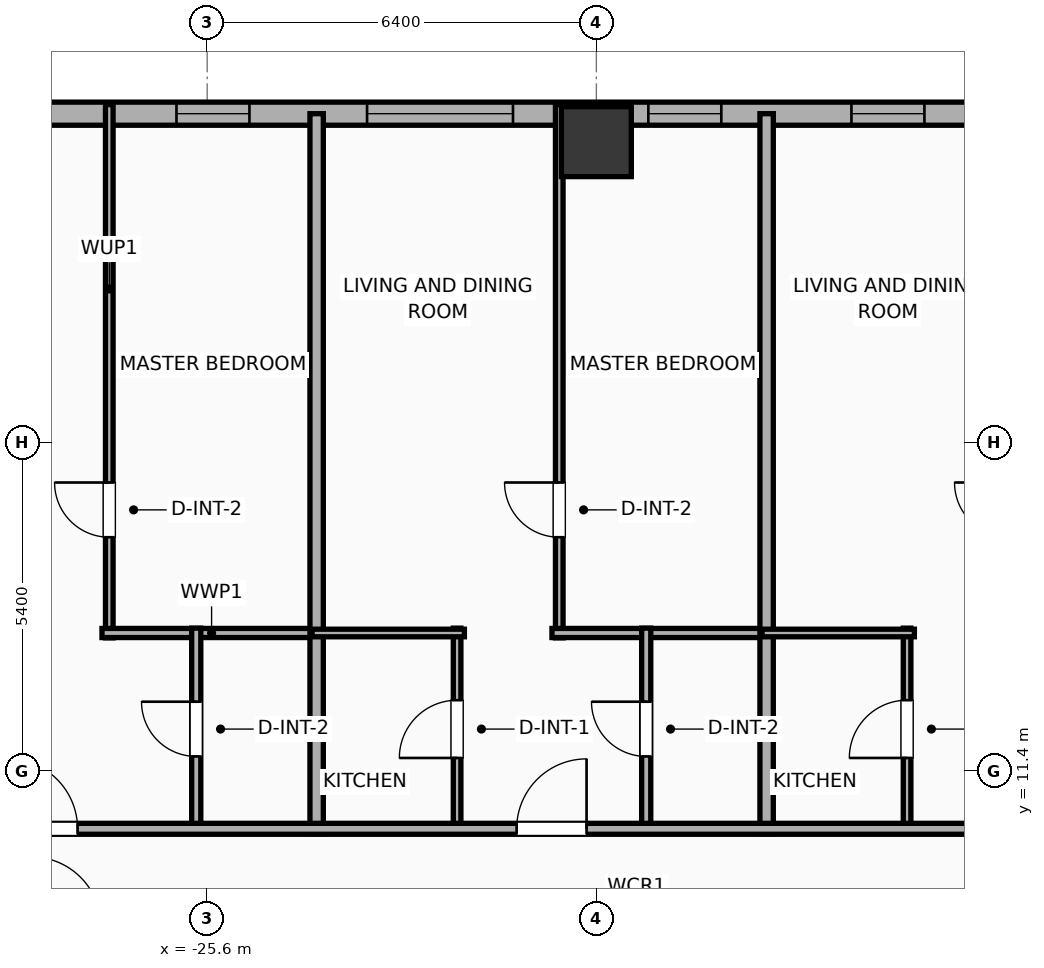
"""IFC4 building model, lengths in metres.
Left out: names, types, materials, properties, quantities, classifications, styles, units other than length and angle.
Written with IfcOpenShell. Run it as: python <this file> out.ifc"""

import sys

from ifc_helpers import new_model, si_unit, direction, frame, frame_2d, origin, origin_2d, place, context, subcontext, project, spatial, rectangle, hollow_rectangle, extrude, element, fill, save


model = new_model("IFC4")
c1 = context("Model", 3, precision=1e-05, world=origin(), true_north=direction((0.0, 1.0)))
c2 = subcontext(c1, "Body", "Model", "MODEL_VIEW")
j1 = project(units=[si_unit("LENGTHUNIT", "METRE"), si_unit("PLANEANGLEUNIT", "RADIAN")], contexts=[c1])
p1 = place(None, origin())
s1 = spatial("IfcSite", under=j1, at=p1, CompositionType="ELEMENT")
p2 = place(p1, origin())
s2 = spatial("IfcBuilding", under=s1, at=p2, CompositionType="ELEMENT")
p3 = place(p2, frame((0.0, 0.0, 57.2)))
s3 = spatial("IfcBuildingStorey", under=s2, at=p3, CompositionType="ELEMENT", Elevation=57.2)
p4 = place(p3, frame((-19.2, 21.75, 0.0), z_axis=(0.0, 0.0, 1.0), x_axis=(1.0, 0.0, 0.0)))
e1 = element("IfcColumn", 1, at=p4, inside=s3, PredefinedType="COLUMN", context=c2, shape_type="SweptSolid", body=[
    extrude(hollow_rectangle(XDim=1.15, YDim=1.15, WallThickness=0.04, at=origin_2d()), origin(), (0.0, 0.0, 1.0), 3.9),
])
p5 = place(p3, frame((-29.581, 22.21, 0.0), z_axis=(0.0, 0.0, 1.0), x_axis=(1.0, 0.0, 0.0)))
e2 = element("IfcWall", 2, at=p5, inside=s3, PredefinedType="ELEMENTEDWALL", context=c2, shape_type="SweptSolid", body=[
    extrude(rectangle(XDim=51.963, YDim=0.38, at=frame_2d((25.981, 0.0))), origin(), (0.0, 0.0, 1.0), 3.65),
])
p6 = place(p5, frame((6.61, 0.0, 0.75)))
e3 = element("IfcOpeningElement", 3, at=p6, cuts=e2, PredefinedType="OPENING", context=c2, shape_type="SweptSolid", body=[
    extrude(rectangle(XDim=2.4, YDim=2.1, at=frame_2d((1.2, 1.05))), frame((0.0, 0.2, 0.0), z_axis=(0.0, -1.0, 0.0), x_axis=(1.0, 0.0, 0.0)), (0.0, 0.0, 1.0), 0.4),
])
p7 = place(p5, frame((24.781, 0.0, 0.75)))
e4 = element("IfcOpeningElement", 4, at=p7, cuts=e2, PredefinedType="OPENING", context=c2, shape_type="SweptSolid", body=[
    extrude(rectangle(XDim=2.4, YDim=2.1, at=frame_2d((1.2, 1.05))), frame((0.0, 0.2, 0.0), z_axis=(0.0, -1.0, 0.0), x_axis=(1.0, 0.0, 0.0)), (0.0, 0.0, 1.0), 0.4),
])
p8 = place(p5, frame((42.952, 0.0, 0.75)))
e5 = element("IfcOpeningElement", 5, at=p8, cuts=e2, PredefinedType="OPENING", context=c2, shape_type="SweptSolid", body=[
    extrude(rectangle(XDim=2.4, YDim=2.1, at=frame_2d((1.2, 1.05))), frame((0.0, 0.2, 0.0), z_axis=(0.0, -1.0, 0.0), x_axis=(1.0, 0.0, 0.0)), (0.0, 0.0, 1.0), 0.4),
])
p9 = place(p5, frame((3.476, 0.0, 0.75)))
e6 = element("IfcOpeningElement", 6, at=p9, cuts=e2, PredefinedType="OPENING", context=c2, shape_type="SweptSolid", body=[
    extrude(rectangle(XDim=1.2, YDim=2.05, at=frame_2d((0.6, 1.025))), frame((0.0, 0.2, 0.0), z_axis=(0.0, -1.0, 0.0), x_axis=(1.0, 0.0, 0.0)), (0.0, 0.0, 1.0), 0.4),
])
p10 = place(p5, frame((11.236, 0.0, 0.75)))
e7 = element("IfcOpeningElement", 7, at=p10, cuts=e2, PredefinedType="OPENING", context=c2, shape_type="SweptSolid", body=[
    extrude(rectangle(XDim=1.2, YDim=2.05, at=frame_2d((0.6, 1.025))), frame((0.0, 0.2, 0.0), z_axis=(0.0, -1.0, 0.0), x_axis=(1.0, 0.0, 0.0)), (0.0, 0.0, 1.0), 0.4),
])
p11 = place(p5, frame((14.576, 0.0, 0.75)))
e8 = element("IfcOpeningElement", 8, at=p11, cuts=e2, PredefinedType="OPENING", context=c2, shape_type="SweptSolid", body=[
    extrude(rectangle(XDim=1.2, YDim=2.05, at=frame_2d((0.6, 1.025))), frame((0.0, 0.2, 0.0), z_axis=(0.0, -1.0, 0.0), x_axis=(1.0, 0.0, 0.0)), (0.0, 0.0, 1.0), 0.4),
])
p12 = place(p5, frame((18.276, 0.0, 0.75)))
e9 = element("IfcOpeningElement", 9, at=p12, cuts=e2, PredefinedType="OPENING", context=c2, shape_type="SweptSolid", body=[
    extrude(rectangle(XDim=1.2, YDim=2.05, at=frame_2d((0.6, 1.025))), frame((0.0, 0.2, 0.0), z_axis=(0.0, -1.0, 0.0), x_axis=(1.0, 0.0, 0.0)), (0.0, 0.0, 1.0), 0.4),
])
p13 = place(p5, frame((21.976, 0.0, 0.75)))
e10 = element("IfcOpeningElement", 10, at=p13, cuts=e2, PredefinedType="OPENING", context=c2, shape_type="SweptSolid", body=[
    extrude(rectangle(XDim=1.2, YDim=2.05, at=frame_2d((0.6, 1.025))), frame((0.0, 0.2, 0.0), z_axis=(0.0, -1.0, 0.0), x_axis=(1.0, 0.0, 0.0)), (0.0, 0.0, 1.0), 0.4),
])
p14 = place(p5, frame((29.136, 0.0, 0.75)))
e11 = element("IfcOpeningElement", 11, at=p14, cuts=e2, PredefinedType="OPENING", context=c2, shape_type="SweptSolid", body=[
    extrude(rectangle(XDim=1.2, YDim=2.05, at=frame_2d((0.6, 1.025))), frame((0.0, 0.2, 0.0), z_axis=(0.0, -1.0, 0.0), x_axis=(1.0, 0.0, 0.0)), (0.0, 0.0, 1.0), 0.4),
])
p15 = place(p5, frame((33.076, 0.0, 0.75)))
e12 = element("IfcOpeningElement", 12, at=p15, cuts=e2, PredefinedType="OPENING", context=c2, shape_type="SweptSolid", body=[
    extrude(rectangle(XDim=1.2, YDim=2.05, at=frame_2d((0.6, 1.025))), frame((0.0, 0.2, 0.0), z_axis=(0.0, -1.0, 0.0), x_axis=(1.0, 0.0, 0.0)), (0.0, 0.0, 1.0), 0.4),
])
p16 = place(p5, frame((36.776, 0.0, 0.75)))
e13 = element("IfcOpeningElement", 13, at=p16, cuts=e2, PredefinedType="OPENING", context=c2, shape_type="SweptSolid", body=[
    extrude(rectangle(XDim=1.2, YDim=2.05, at=frame_2d((0.6, 1.025))), frame((0.0, 0.2, 0.0), z_axis=(0.0, -1.0, 0.0), x_axis=(1.0, 0.0, 0.0)), (0.0, 0.0, 1.0), 0.4),
])
p17 = place(p5, frame((39.931, 0.0, 0.75)))
e14 = element("IfcOpeningElement", 14, at=p17, cuts=e2, PredefinedType="OPENING", context=c2, shape_type="SweptSolid", body=[
    extrude(rectangle(XDim=0.85, YDim=2.05, at=frame_2d((0.425, 1.025))), frame((0.0, 0.2, 0.0), z_axis=(0.0, -1.0, 0.0), x_axis=(1.0, 0.0, 0.0)), (0.0, 0.0, 1.0), 0.4),
])
p18 = place(p5, frame((47.469, 0.0, 0.75)))
e15 = element("IfcOpeningElement", 15, at=p18, cuts=e2, PredefinedType="OPENING", context=c2, shape_type="SweptSolid", body=[
    extrude(rectangle(XDim=1.2, YDim=2.05, at=frame_2d((0.6, 1.025))), frame((0.0, 0.2, 0.0), z_axis=(0.0, -1.0, 0.0), x_axis=(1.0, 0.0, 0.0)), (0.0, 0.0, 1.0), 0.4),
])
p19 = place(p5, frame((49.581, 0.0, 0.75)))
e16 = element("IfcOpeningElement", 16, at=p19, cuts=e2, PredefinedType="OPENING", context=c2, shape_type="SweptSolid", body=[
    extrude(rectangle(XDim=1.2, YDim=2.05, at=frame_2d((0.6, 1.025))), frame((0.0, 0.2, 0.0), z_axis=(0.0, -1.0, 0.0), x_axis=(1.0, 0.0, 0.0)), (0.0, 0.0, 1.0), 0.4),
])
p20 = place(p3, frame((-27.21, 13.59, 0.0), z_axis=(0.0, 0.0, 1.0), x_axis=(0.0, 1.0, 0.0)))
e17 = element("IfcWall", 17, at=p20, inside=s3, PredefinedType="PARTITIONING", context=c2, shape_type="SweptSolid", body=[
    extrude(rectangle(XDim=8.77, YDim=0.125, at=frame_2d((4.385, 0.0))), origin(), (0.0, 0.0, 1.0), 3.65),
])
p21 = place(p20, frame((1.655, 0.0, 0.0)))
e18 = element("IfcOpeningElement", 18, at=p21, cuts=e17, PredefinedType="OPENING", context=c2, shape_type="SweptSolid", body=[
    extrude(rectangle(XDim=0.9, YDim=2.05, at=frame_2d((0.45, 1.025))), frame((0.0, 0.073, 0.0), z_axis=(0.0, -1.0, 0.0), x_axis=(1.0, 0.0, 0.0)), (0.0, 0.0, 1.0), 0.145),
])
p22 = place(p3, frame((-27.33, 13.67, 0.0), z_axis=(0.0, 0.0, 1.0), x_axis=(1.0, 0.0, 0.0)))
e19 = element("IfcWall", 19, at=p22, inside=s3, PredefinedType="PLUMBINGWALL", context=c2, shape_type="SweptSolid", body=[
    extrude(rectangle(XDim=3.605, YDim=0.15, at=frame_2d((1.802, 0.0))), origin(), (0.0, 0.0, 1.0), 3.65),
])
p23 = place(p3, frame((-25.78, 10.43, 0.0), z_axis=(0.0, 0.0, 1.0), x_axis=(0.0, 1.0, 0.0)))
e20 = element("IfcWall", 20, at=p23, inside=s3, PredefinedType="PLUMBINGWALL", context=c2, shape_type="SweptSolid", body=[
    extrude(rectangle(XDim=3.32, YDim=0.15, at=frame_2d((1.66, 0.0))), origin(), (0.0, 0.0, 1.0), 3.65),
])
p24 = place(p23, frame((1.21, 0.0, 0.0)))
e21 = element("IfcOpeningElement", 21, at=p24, cuts=e20, PredefinedType="OPENING", context=c2, shape_type="SweptSolid", body=[
    extrude(rectangle(XDim=0.9, YDim=2.05, at=frame_2d((0.45, 1.025))), frame((0.0, 0.085, 0.0), z_axis=(0.0, -1.0, 0.0), x_axis=(1.0, 0.0, 0.0)), (0.0, 0.0, 1.0), 0.17),
])
p25 = place(p3, frame((-23.8, 10.37, 0.0), z_axis=(0.0, 0.0, 1.0), x_axis=(0.0, 1.0, 0.0)))
e22 = element("IfcWall", 22, at=p25, inside=s3, PredefinedType="PARTITIONING", context=c2, shape_type="SweptSolid", body=[
    extrude(rectangle(XDim=11.84, YDim=0.22, at=frame_2d((5.92, 0.0))), origin(), (0.0, 0.0, 1.0), 3.65),
])
p26 = place(p3, frame((-19.81, 13.59, 0.0), z_axis=(0.0, 0.0, 1.0), x_axis=(0.0, 1.0, 0.0)))
e23 = element("IfcWall", 23, at=p26, inside=s3, PredefinedType="PARTITIONING", context=c2, shape_type="SweptSolid", body=[
    extrude(rectangle(XDim=8.77, YDim=0.125, at=frame_2d((4.385, 0.0))), origin(), (0.0, 0.0, 1.0), 3.65),
])
p27 = place(p26, frame((1.655, 0.0, 0.0)))
e24 = element("IfcOpeningElement", 24, at=p27, cuts=e23, PredefinedType="OPENING", context=c2, shape_type="SweptSolid", body=[
    extrude(rectangle(XDim=0.9, YDim=2.05, at=frame_2d((0.45, 1.025))), frame((0.0, 0.073, 0.0), z_axis=(0.0, -1.0, 0.0), x_axis=(1.0, 0.0, 0.0)), (0.0, 0.0, 1.0), 0.145),
])
p28 = place(p3, frame((-19.93, 13.67, 0.0), z_axis=(0.0, 0.0, 1.0), x_axis=(1.0, 0.0, 0.0)))
e25 = element("IfcWall", 25, at=p28, inside=s3, PredefinedType="PLUMBINGWALL", context=c2, shape_type="SweptSolid", body=[
    extrude(rectangle(XDim=3.605, YDim=0.15, at=frame_2d((1.802, 0.0))), origin(), (0.0, 0.0, 1.0), 3.65),
])
p29 = place(p3, frame((-21.49, 10.43, 0.0), z_axis=(0.0, 0.0, 1.0), x_axis=(0.0, 1.0, 0.0)))
e26 = element("IfcWall", 26, at=p29, inside=s3, PredefinedType="PARTITIONING", context=c2, shape_type="SweptSolid", body=[
    extrude(rectangle(XDim=3.32, YDim=0.125, at=frame_2d((1.66, 0.0))), origin(), (0.0, 0.0, 1.0), 3.65),
])
p30 = place(p29, frame((1.185, 0.0, 0.0)))
e27 = element("IfcOpeningElement", 27, at=p30, cuts=e26, PredefinedType="OPENING", context=c2, shape_type="SweptSolid", body=[
    extrude(rectangle(XDim=0.95, YDim=2.05, at=frame_2d((0.475, 1.025))), frame((0.0, 0.073, 0.0), z_axis=(0.0, -1.0, 0.0), x_axis=(1.0, 0.0, 0.0)), (0.0, 0.0, 1.0), 0.145),
])
p31 = place(p3, frame((-23.875, 13.67, 0.0), z_axis=(0.0, 0.0, 1.0), x_axis=(1.0, 0.0, 0.0)))
e28 = element("IfcWall", 28, at=p31, inside=s3, PredefinedType="PARTITIONING", context=c2, shape_type="SweptSolid", body=[
    extrude(rectangle(XDim=2.505, YDim=0.125, at=frame_2d((1.252, 0.0))), origin(), (0.0, 0.0, 1.0), 3.65),
])
p32 = place(p3, frame((-18.38, 10.43, 0.0), z_axis=(0.0, 0.0, 1.0), x_axis=(0.0, 1.0, 0.0)))
e29 = element("IfcWall", 29, at=p32, inside=s3, PredefinedType="PLUMBINGWALL", context=c2, shape_type="SweptSolid", body=[
    extrude(rectangle(XDim=3.32, YDim=0.15, at=frame_2d((1.66, 0.0))), origin(), (0.0, 0.0, 1.0), 3.65),
])
p33 = place(p32, frame((1.21, 0.0, 0.0)))
e30 = element("IfcOpeningElement", 30, at=p33, cuts=e29, PredefinedType="OPENING", context=c2, shape_type="SweptSolid", body=[
    extrude(rectangle(XDim=0.9, YDim=2.05, at=frame_2d((0.45, 1.025))), frame((0.0, 0.085, 0.0), z_axis=(0.0, -1.0, 0.0), x_axis=(1.0, 0.0, 0.0)), (0.0, 0.0, 1.0), 0.17),
])
p34 = place(p3, frame((-16.4, 10.37, 0.0), z_axis=(0.0, 0.0, 1.0), x_axis=(0.0, 1.0, 0.0)))
e31 = element("IfcWall", 31, at=p34, inside=s3, PredefinedType="PARTITIONING", context=c2, shape_type="SweptSolid", body=[
    extrude(rectangle(XDim=11.84, YDim=0.22, at=frame_2d((5.92, 0.0))), origin(), (0.0, 0.0, 1.0), 3.65),
])
p35 = place(p3, frame((-14.09, 10.43, 0.0), z_axis=(0.0, 0.0, 1.0), x_axis=(0.0, 1.0, 0.0)))
e32 = element("IfcWall", 32, at=p35, inside=s3, PredefinedType="PARTITIONING", context=c2, shape_type="SweptSolid", body=[
    extrude(rectangle(XDim=3.32, YDim=0.125, at=frame_2d((1.66, 0.0))), origin(), (0.0, 0.0, 1.0), 3.65),
])
p36 = place(p35, frame((1.185, 0.0, 0.0)))
e33 = element("IfcOpeningElement", 33, at=p36, cuts=e32, PredefinedType="OPENING", context=c2, shape_type="SweptSolid", body=[
    extrude(rectangle(XDim=0.95, YDim=2.05, at=frame_2d((0.475, 1.025))), frame((0.0, 0.073, 0.0), z_axis=(0.0, -1.0, 0.0), x_axis=(1.0, 0.0, 0.0)), (0.0, 0.0, 1.0), 0.145),
])
p37 = place(p3, frame((-16.475, 13.67, 0.0), z_axis=(0.0, 0.0, 1.0), x_axis=(1.0, 0.0, 0.0)))
e34 = element("IfcWall", 34, at=p37, inside=s3, PredefinedType="PARTITIONING", context=c2, shape_type="SweptSolid", body=[
    extrude(rectangle(XDim=2.505, YDim=0.125, at=frame_2d((1.252, 0.0))), origin(), (0.0, 0.0, 1.0), 3.65),
])
p38 = place(p3, frame((-33.41, 10.45, 0.0), z_axis=(0.0, 0.0, 1.0), x_axis=(1.0, 0.0, 0.0)))
e35 = element("IfcWall", 35, at=p38, inside=s3, PredefinedType="PARTITIONING", context=c2, shape_type="SweptSolid", body=[
    extrude(rectangle(XDim=59.62, YDim=0.18, at=frame_2d((29.81, 0.0))), origin(), (0.0, 0.0, 1.0), 3.65),
])
p39 = place(p38, frame((4.529, 0.0, 0.0)))
e36 = element("IfcOpeningElement", 36, at=p39, cuts=e35, PredefinedType="OPENING", context=c2, shape_type="SweptSolid", body=[
    extrude(rectangle(XDim=1.15, YDim=2.05, at=frame_2d((0.575, 1.025))), frame((0.0, 0.1, 0.0), z_axis=(0.0, -1.0, 0.0), x_axis=(1.0, 0.0, 0.0)), (0.0, 0.0, 1.0), 0.2),
])
p40 = place(p38, frame((12.899, 0.0, 0.0)))
e37 = element("IfcOpeningElement", 37, at=p40, cuts=e35, PredefinedType="OPENING", context=c2, shape_type="SweptSolid", body=[
    extrude(rectangle(XDim=1.15, YDim=2.05, at=frame_2d((0.575, 1.025))), frame((0.0, 0.1, 0.0), z_axis=(0.0, -1.0, 0.0), x_axis=(1.0, 0.0, 0.0)), (0.0, 0.0, 1.0), 0.2),
])
p41 = place(p38, frame((20.298, 0.0, 0.0)))
e38 = element("IfcOpeningElement", 38, at=p41, cuts=e35, PredefinedType="OPENING", context=c2, shape_type="SweptSolid", body=[
    extrude(rectangle(XDim=1.15, YDim=2.05, at=frame_2d((0.575, 1.025))), frame((0.0, 0.1, 0.0), z_axis=(0.0, -1.0, 0.0), x_axis=(1.0, 0.0, 0.0)), (0.0, 0.0, 1.0), 0.2),
])
p42 = place(p38, frame((27.703, 0.0, 0.0)))
e39 = element("IfcOpeningElement", 39, at=p42, cuts=e35, PredefinedType="OPENING", context=c2, shape_type="SweptSolid", body=[
    extrude(rectangle(XDim=1.15, YDim=2.05, at=frame_2d((0.575, 1.025))), frame((0.0, 0.1, 0.0), z_axis=(0.0, -1.0, 0.0), x_axis=(1.0, 0.0, 0.0)), (0.0, 0.0, 1.0), 0.2),
])
p43 = place(p38, frame((35.102, 0.0, 0.0)))
e40 = element("IfcOpeningElement", 40, at=p43, cuts=e35, PredefinedType="OPENING", context=c2, shape_type="SweptSolid", body=[
    extrude(rectangle(XDim=1.15, YDim=2.05, at=frame_2d((0.575, 1.025))), frame((0.0, 0.1, 0.0), z_axis=(0.0, -1.0, 0.0), x_axis=(1.0, 0.0, 0.0)), (0.0, 0.0, 1.0), 0.2),
])
p44 = place(p38, frame((42.5, 0.0, 0.0)))
e41 = element("IfcOpeningElement", 41, at=p44, cuts=e35, PredefinedType="OPENING", context=c2, shape_type="SweptSolid", body=[
    extrude(rectangle(XDim=1.15, YDim=2.05, at=frame_2d((0.575, 1.025))), frame((0.0, 0.1, 0.0), z_axis=(0.0, -1.0, 0.0), x_axis=(1.0, 0.0, 0.0)), (0.0, 0.0, 1.0), 0.2),
])
p45 = place(p38, frame((48.099, 0.0, 0.0)))
e42 = element("IfcOpeningElement", 42, at=p45, cuts=e35, PredefinedType="OPENING", context=c2, shape_type="SweptSolid", body=[
    extrude(rectangle(XDim=1.15, YDim=2.05, at=frame_2d((0.575, 1.025))), frame((0.0, 0.1, 0.0), z_axis=(0.0, -1.0, 0.0), x_axis=(1.0, 0.0, 0.0)), (0.0, 0.0, 1.0), 0.2),
])
p46 = place(p38, frame((56.117, 0.0, 0.0)))
e43 = element("IfcOpeningElement", 43, at=p46, cuts=e35, PredefinedType="OPENING", context=c2, shape_type="SweptSolid", body=[
    extrude(rectangle(XDim=0.9, YDim=2.05, at=frame_2d((0.45, 1.025))), frame((0.0, 0.1, 0.0), z_axis=(0.0, -1.0, 0.0), x_axis=(1.0, 0.0, 0.0)), (0.0, 0.0, 1.0), 0.2),
])
p47 = place(p6, origin())
e44 = element("IfcWindow", 44, at=p47, inside=s3, PartitioningType="SINGLE_PANEL", PredefinedType="WINDOW", context=c2, shape_type="SweptSolid", body=[
    extrude(rectangle(XDim=2.4, YDim=2.1, at=frame_2d((1.2, 1.05))), frame((0.0, 0.03, 0.0), z_axis=(0.0, -1.0, 0.0), x_axis=(1.0, 0.0, 0.0)), (0.0, 0.0, 1.0), 0.06),
])
fill(e3, e44)
p48 = place(p9, origin())
e45 = element("IfcWindow", 45, at=p48, inside=s3, PartitioningType="SINGLE_PANEL", PredefinedType="WINDOW", context=c2, shape_type="SweptSolid", body=[
    extrude(rectangle(XDim=1.2, YDim=2.05, at=frame_2d((0.6, 1.025))), frame((0.0, 0.03, 0.0), z_axis=(0.0, -1.0, 0.0), x_axis=(1.0, 0.0, 0.0)), (0.0, 0.0, 1.0), 0.06),
])
fill(e6, e45)
p49 = place(p10, origin())
e46 = element("IfcWindow", 46, at=p49, inside=s3, PartitioningType="SINGLE_PANEL", PredefinedType="WINDOW", context=c2, shape_type="SweptSolid", body=[
    extrude(rectangle(XDim=1.2, YDim=2.05, at=frame_2d((0.6, 1.025))), frame((0.0, 0.03, 0.0), z_axis=(0.0, -1.0, 0.0), x_axis=(1.0, 0.0, 0.0)), (0.0, 0.0, 1.0), 0.06),
])
fill(e7, e46)
p50 = place(p11, origin())
e47 = element("IfcWindow", 47, at=p50, inside=s3, PartitioningType="SINGLE_PANEL", PredefinedType="WINDOW", context=c2, shape_type="SweptSolid", body=[
    extrude(rectangle(XDim=1.2, YDim=2.05, at=frame_2d((0.6, 1.025))), frame((0.0, 0.03, 0.0), z_axis=(0.0, -1.0, 0.0), x_axis=(1.0, 0.0, 0.0)), (0.0, 0.0, 1.0), 0.06),
])
fill(e8, e47)
p51 = place(p21, origin())
e48 = element("IfcDoor", 48, at=p51, inside=s3, OperationType="SINGLE_SWING_RIGHT", PredefinedType="DOOR", context=c2, shape_type="SweptSolid", body=[
    extrude(rectangle(XDim=0.9, YDim=2.05, at=frame_2d((0.45, 1.025))), frame((0.0, 0.025, 0.0), z_axis=(0.0, -1.0, 0.0), x_axis=(1.0, 0.0, 0.0)), (0.0, 0.0, 1.0), 0.05),
])
fill(e18, e48)
p52 = place(p24, origin())
e49 = element("IfcDoor", 49, at=p52, inside=s3, OperationType="SINGLE_SWING_RIGHT", PredefinedType="DOOR", context=c2, shape_type="SweptSolid", body=[
    extrude(rectangle(XDim=0.9, YDim=2.05, at=frame_2d((0.45, 1.025))), frame((0.0, 0.025, 0.0), z_axis=(0.0, -1.0, 0.0), x_axis=(1.0, 0.0, 0.0)), (0.0, 0.0, 1.0), 0.05),
])
fill(e21, e49)
p53 = place(p27, origin())
e50 = element("IfcDoor", 50, at=p53, inside=s3, OperationType="SINGLE_SWING_RIGHT", PredefinedType="DOOR", context=c2, shape_type="SweptSolid", body=[
    extrude(rectangle(XDim=0.9, YDim=2.05, at=frame_2d((0.45, 1.025))), frame((0.0, 0.025, 0.0), z_axis=(0.0, -1.0, 0.0), x_axis=(1.0, 0.0, 0.0)), (0.0, 0.0, 1.0), 0.05),
])
fill(e24, e50)
p54 = place(p30, origin())
e51 = element("IfcDoor", 51, at=p54, inside=s3, OperationType="SINGLE_SWING_LEFT", PredefinedType="DOOR", context=c2, shape_type="SweptSolid", body=[
    extrude(rectangle(XDim=0.95, YDim=2.05, at=frame_2d((0.475, 1.025))), frame((0.0, 0.025, 0.0), z_axis=(0.0, -1.0, 0.0), x_axis=(1.0, 0.0, 0.0)), (0.0, 0.0, 1.0), 0.05),
])
fill(e27, e51)
p55 = place(p33, origin())
e52 = element("IfcDoor", 52, at=p55, inside=s3, OperationType="SINGLE_SWING_RIGHT", PredefinedType="DOOR", context=c2, shape_type="SweptSolid", body=[
    extrude(rectangle(XDim=0.9, YDim=2.05, at=frame_2d((0.45, 1.025))), frame((0.0, 0.025, 0.0), z_axis=(0.0, -1.0, 0.0), x_axis=(1.0, 0.0, 0.0)), (0.0, 0.0, 1.0), 0.05),
])
fill(e30, e52)
p56 = place(p36, origin())
e53 = element("IfcDoor", 53, at=p56, inside=s3, OperationType="SINGLE_SWING_LEFT", PredefinedType="DOOR", context=c2, shape_type="SweptSolid", body=[
    extrude(rectangle(XDim=0.95, YDim=2.05, at=frame_2d((0.475, 1.025))), frame((0.0, 0.025, 0.0), z_axis=(0.0, -1.0, 0.0), x_axis=(1.0, 0.0, 0.0)), (0.0, 0.0, 1.0), 0.05),
])
fill(e33, e53)
p57 = place(p39, origin())
e54 = element("IfcDoor", 54, at=p57, inside=s3, OperationType="SINGLE_SWING_LEFT", PredefinedType="DOOR", context=c2, shape_type="SweptSolid", body=[
    extrude(rectangle(XDim=1.15, YDim=2.05, at=frame_2d((0.575, 1.025))), frame((0.0, 0.025, 0.0), z_axis=(0.0, -1.0, 0.0), x_axis=(1.0, 0.0, 0.0)), (0.0, 0.0, 1.0), 0.05),
])
fill(e36, e54)
p58 = place(p40, origin())
e55 = element("IfcDoor", 55, at=p58, inside=s3, OperationType="SINGLE_SWING_RIGHT", PredefinedType="DOOR", context=c2, shape_type="SweptSolid", body=[
    extrude(rectangle(XDim=1.15, YDim=2.05, at=frame_2d((0.575, 1.025))), frame((0.0, 0.025, 0.0), z_axis=(0.0, -1.0, 0.0), x_axis=(1.0, 0.0, 0.0)), (0.0, 0.0, 1.0), 0.05),
])
fill(e37, e55)
save(model, sys.argv[1])
